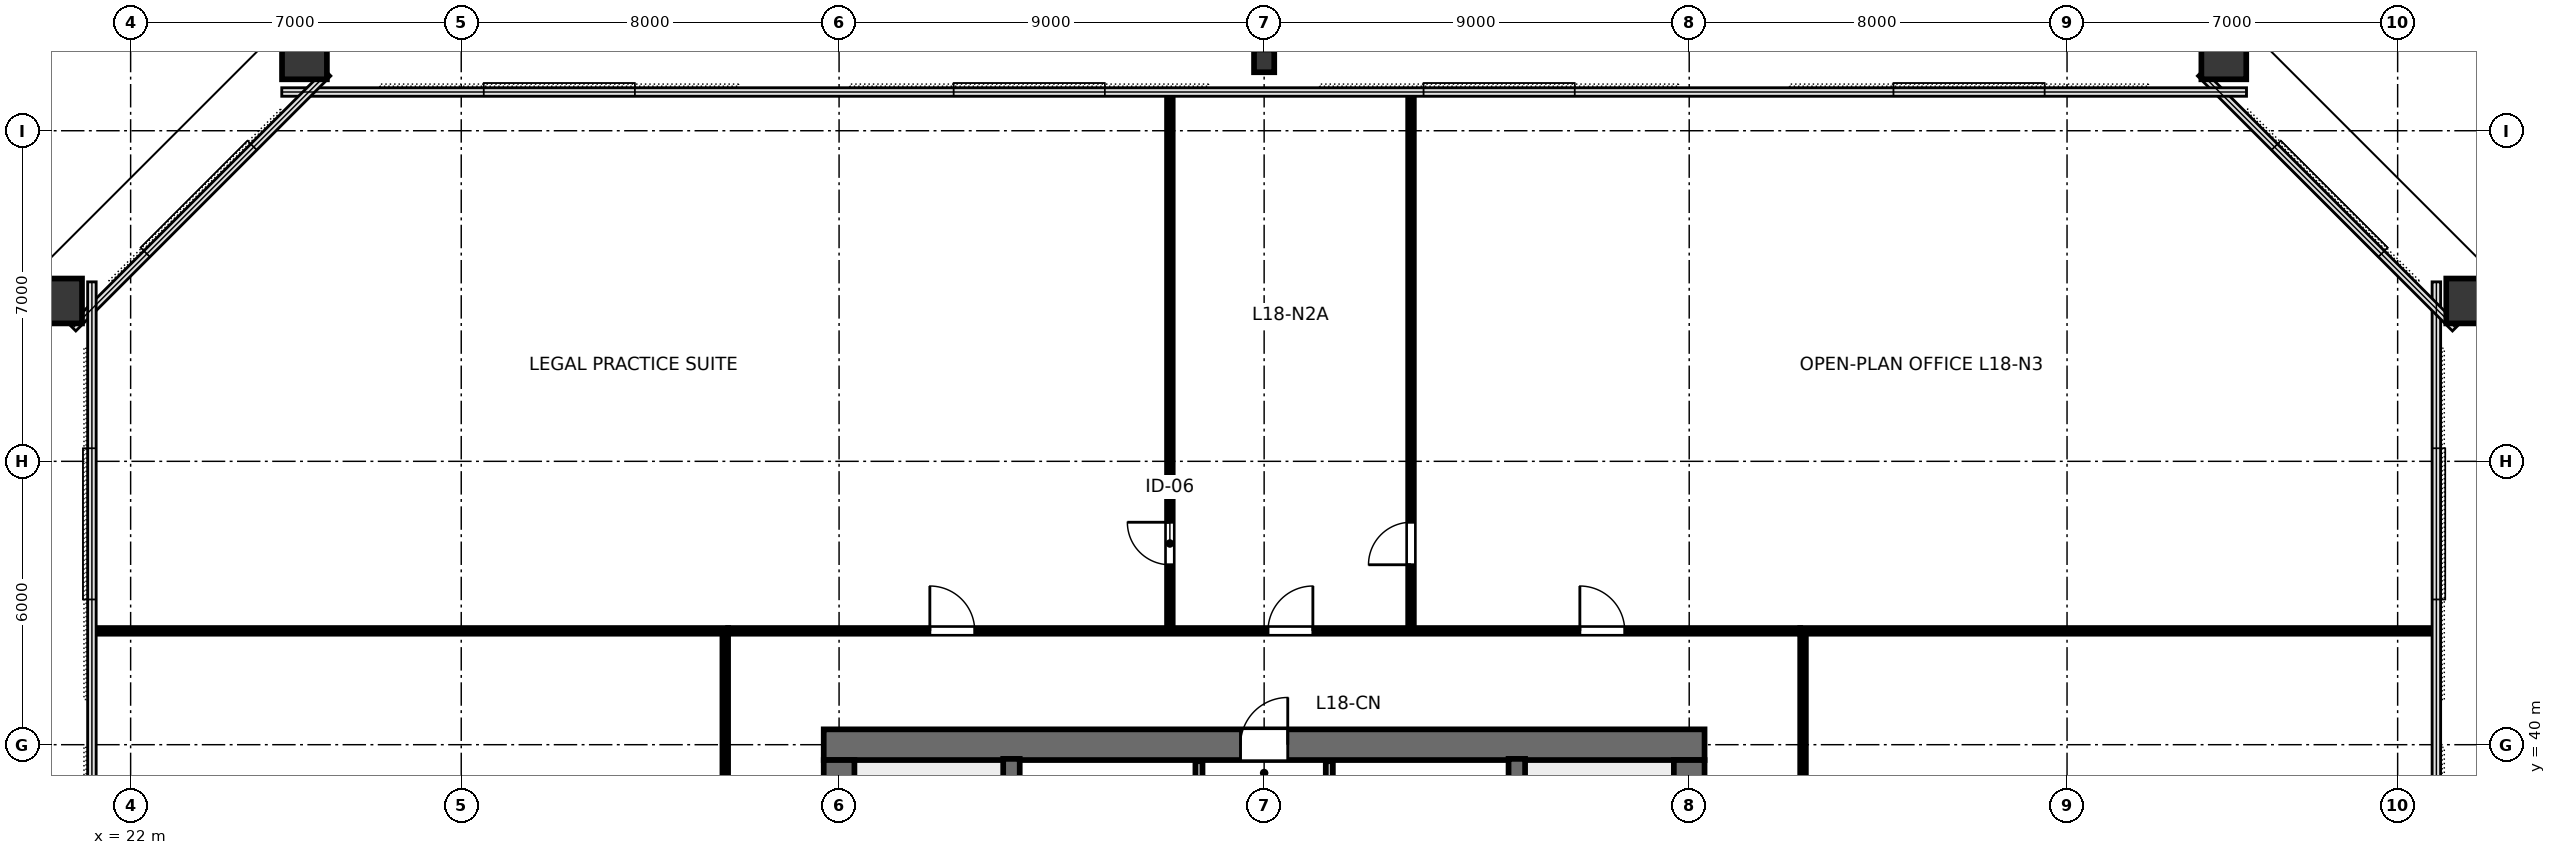
"""IFC4 building model, lengths in metres.
Left out: names, types, materials, properties, quantities, classifications, styles, units other than length and angle.
Written with IfcOpenShell. Run it as: python <this file> out.ifc"""

import sys

from ifc_helpers import new_model, si_unit, direction, frame, frame_2d, origin, origin_2d, place, context, subcontext, project, spatial, rectangle, hollow_rectangle, i_section, extrude, element, fill, save


model = new_model("IFC4")
c1 = context("Model", 3, precision=1e-05, world=origin(), true_north=direction((0.0, 1.0)))
c2 = subcontext(c1, "Body", "Model", "MODEL_VIEW")
j1 = project(units=[si_unit("LENGTHUNIT", "METRE"), si_unit("PLANEANGLEUNIT", "RADIAN")], contexts=[c1])
p1 = place(None, origin())
s1 = spatial("IfcSite", under=j1, at=p1, CompositionType="ELEMENT")
p2 = place(p1, origin())
s2 = spatial("IfcBuilding", under=s1, at=p2, CompositionType="ELEMENT")
p3 = place(p2, frame((0.0, 0.0, 71.2)))
s3 = spatial("IfcBuildingStorey", under=s2, at=p3, CompositionType="ELEMENT", Elevation=71.2)
p4 = place(p3, frame((36.675, 40.0, 0.0), z_axis=(0.0, 0.0, 1.0), x_axis=(1.0, 0.0, 0.0)))
e1 = element("IfcWall", 1, at=p4, inside=s3, PredefinedType="SHEAR", context=c2, shape_type="SweptSolid", body=[
    extrude(rectangle(XDim=18.65, YDim=0.65, at=frame_2d((9.325, 0.0))), origin(), (0.0, 0.0, 1.0), 3.36),
])
p5 = place(p4, frame((8.825, 0.0, 0.0)))
e2 = element("IfcOpeningElement", 2, at=p5, cuts=e1, PredefinedType="OPENING", context=c2, shape_type="SweptSolid", body=[
    extrude(rectangle(XDim=1.0, YDim=2.15, at=frame_2d((0.5, 1.075))), frame((0.0, 0.335, 0.0), z_axis=(0.0, -1.0, 0.0), x_axis=(1.0, 0.0, 0.0)), (0.0, 0.0, 1.0), 0.67),
])
p6 = place(p3, frame((37.0, 24.325, 0.0), z_axis=(0.0, 0.0, 1.0), x_axis=(0.0, 1.0, 0.0)))
e3 = element("IfcWall", 3, at=p6, inside=s3, PredefinedType="SHEAR", context=c2, shape_type="SweptSolid", body=[
    extrude(rectangle(XDim=15.35, YDim=0.65, at=frame_2d((7.675, 0.0))), origin(), (0.0, 0.0, 1.0), 3.36),
])
p7 = place(p6, frame((5.2, 0.0, 0.0)))
e4 = element("IfcOpeningElement", 4, at=p7, cuts=e3, PredefinedType="OPENING", context=c2, shape_type="SweptSolid", body=[
    extrude(rectangle(XDim=1.15, YDim=2.15, at=frame_2d((0.575, 1.075))), frame((0.0, 0.335, 0.0), z_axis=(0.0, -1.0, 0.0), x_axis=(1.0, 0.0, 0.0)), (0.0, 0.0, 1.0), 0.67),
])
p8 = place(p3, frame((55.0, 24.325, 0.0), z_axis=(0.0, 0.0, 1.0), x_axis=(0.0, 1.0, 0.0)))
e5 = element("IfcWall", 5, at=p8, inside=s3, PredefinedType="SHEAR", context=c2, shape_type="SweptSolid", body=[
    extrude(rectangle(XDim=15.35, YDim=0.65, at=frame_2d((7.675, 0.0))), origin(), (0.0, 0.0, 1.0), 3.36),
])
p9 = place(p8, frame((5.2, 0.0, 0.0)))
e6 = element("IfcOpeningElement", 6, at=p9, cuts=e5, PredefinedType="OPENING", context=c2, shape_type="SweptSolid", body=[
    extrude(rectangle(XDim=1.15, YDim=2.15, at=frame_2d((0.575, 1.075))), frame((0.0, 0.335, 0.0), z_axis=(0.0, -1.0, 0.0), x_axis=(1.0, 0.0, 0.0)), (0.0, 0.0, 1.0), 0.67),
])
for number, where, z_axis, x_axis in (
    (7, (71.604, 49.396, 0.0), (0.0, 0.0, 1.0), (0.0, 1.0, 0.0)),
    (8, (66.319, 54.664, 0.0), (0.0, 0.0, 1.0), (1.0, 0.0, 0.0)),
):
    element("IfcColumn", number, at=place(p3, frame(where, z_axis=z_axis, x_axis=x_axis)), inside=s3, PredefinedType="COLUMN", context=c2, shape_type="SweptSolid", body=[
        extrude(hollow_rectangle(XDim=0.95, YDim=1.15, WallThickness=0.06, at=origin_2d()), origin(), (0.0, 0.0, 1.0), 3.358),
    ])
p10 = place(p3, frame((46.0, 54.48, 0.0), z_axis=(0.0, 0.0, 1.0), x_axis=(1.0, 0.0, 0.0)))
e9 = element("IfcColumn", 9, at=p10, inside=s3, PredefinedType="COLUMN", context=c2, shape_type="SweptSolid", body=[
    extrude(i_section(OverallWidth=0.428, OverallDepth=0.483, WebThickness=0.051, FlangeThickness=0.082, FilletRadius=0.025, at=origin_2d()), origin(), (0.0, 0.0, 1.0), 3.358),
])
for number, where, z_axis, x_axis in (
    (10, (25.681, 54.664, 0.0), (0.0, 0.0, 1.0), (1.0, 0.0, 0.0)),
    (11, (20.396, 49.396, 0.0), (0.0, 0.0, 1.0), (0.0, 1.0, 0.0)),
):
    element("IfcColumn", number, at=place(p3, frame(where, z_axis=z_axis, x_axis=x_axis)), inside=s3, PredefinedType="COLUMN", context=c2, shape_type="SweptSolid", body=[
        extrude(hollow_rectangle(XDim=0.95, YDim=1.15, WallThickness=0.06, at=origin_2d()), origin(), (0.0, 0.0, 1.0), 3.358),
    ])
for number, where, z_axis, x_axis in (
    (12, (40.65, 32.0, 0.0), (0.0, 0.0, 1.0), (0.0, 1.0, 0.0)),
    (13, (51.35, 32.0, 0.0), (0.0, 0.0, 1.0), (0.0, 1.0, 0.0)),
):
    element("IfcWall", number, at=place(p3, frame(where, z_axis=z_axis, x_axis=x_axis)), inside=s3, PredefinedType="SHEAR", context=c2, shape_type="SweptSolid", body=[
        extrude(rectangle(XDim=7.7, YDim=0.35, at=frame_2d((3.85, 0.0))), origin(), (0.0, 0.0, 1.0), 3.6),
    ])
p11 = place(p3, frame((44.62, 35.72, 0.0), z_axis=(0.0, 0.0, 1.0), x_axis=(0.0, 1.0, 0.0)))
e14 = element("IfcWall", 14, at=p11, inside=s3, PredefinedType="PARTITIONING", context=c2, shape_type="SweptSolid", body=[
    extrude(rectangle(XDim=3.93, YDim=0.15, at=frame_2d((1.965, 0.0))), origin(), (0.0, 0.0, 1.0), 3.36),
])
p12 = place(p11, frame((1.5, 0.0, 0.0)))
e15 = element("IfcOpeningElement", 15, at=p12, cuts=e14, PredefinedType="OPENING", context=c2, shape_type="SweptSolid", body=[
    extrude(rectangle(XDim=0.9, YDim=2.15, at=frame_2d((0.45, 1.075))), frame((0.0, 0.085, 0.0), z_axis=(0.0, -1.0, 0.0), x_axis=(1.0, 0.0, 0.0)), (0.0, 0.0, 1.0), 0.17),
])
p13 = place(p3, frame((47.38, 35.72, 0.0), z_axis=(0.0, 0.0, 1.0), x_axis=(0.0, 1.0, 0.0)))
e16 = element("IfcWall", 16, at=p13, inside=s3, PredefinedType="PARTITIONING", context=c2, shape_type="SweptSolid", body=[
    extrude(rectangle(XDim=3.93, YDim=0.15, at=frame_2d((1.965, 0.0))), origin(), (0.0, 0.0, 1.0), 3.36),
])
p14 = place(p13, frame((1.5, 0.0, 0.0)))
e17 = element("IfcOpeningElement", 17, at=p14, cuts=e16, PredefinedType="OPENING", context=c2, shape_type="SweptSolid", body=[
    extrude(rectangle(XDim=0.9, YDim=2.15, at=frame_2d((0.45, 1.075))), frame((0.0, 0.085, 0.0), z_axis=(0.0, -1.0, 0.0), x_axis=(1.0, 0.0, 0.0)), (0.0, 0.0, 1.0), 0.17),
])
p15 = place(p3, frame((44.004, 42.41, 0.0), z_axis=(0.0, 0.0, 1.0), x_axis=(0.0, 1.0, 0.0)))
e18 = element("IfcWall", 18, at=p15, inside=s3, PredefinedType="PARTITIONING", context=c2, shape_type="SweptSolid", body=[
    extrude(rectangle(XDim=11.41, YDim=0.12, at=frame_2d((5.705, 0.0))), origin(), (0.0, 0.0, 1.0), 2.64),
])
p16 = place(p15, frame((1.4, 0.0, 0.0)))
e19 = element("IfcOpeningElement", 19, at=p16, cuts=e18, PredefinedType="OPENING", context=c2, shape_type="SweptSolid", body=[
    extrude(rectangle(XDim=0.9, YDim=2.15, at=frame_2d((0.45, 1.075))), frame((0.0, 0.07, 0.0), z_axis=(0.0, -1.0, 0.0), x_axis=(1.0, 0.0, 0.0)), (0.0, 0.0, 1.0), 0.14),
])
p17 = place(p3, frame((49.11, 42.41, 0.0), z_axis=(0.0, 0.0, 1.0), x_axis=(0.0, 1.0, 0.0)))
e20 = element("IfcWall", 20, at=p17, inside=s3, PredefinedType="PARTITIONING", context=c2, shape_type="SweptSolid", body=[
    extrude(rectangle(XDim=11.41, YDim=0.12, at=frame_2d((5.705, 0.0))), origin(), (0.0, 0.0, 1.0), 2.64),
])
p18 = place(p17, frame((1.4, 0.0, 0.0)))
e21 = element("IfcOpeningElement", 21, at=p18, cuts=e20, PredefinedType="OPENING", context=c2, shape_type="SweptSolid", body=[
    extrude(rectangle(XDim=0.9, YDim=2.15, at=frame_2d((0.45, 1.075))), frame((0.0, 0.07, 0.0), z_axis=(0.0, -1.0, 0.0), x_axis=(1.0, 0.0, 0.0)), (0.0, 0.0, 1.0), 0.14),
])
p19 = place(p3, frame((34.65, 42.41, 0.0), z_axis=(0.0, 0.0, 1.0), x_axis=(1.0, 0.0, 0.0)))
e22 = element("IfcWall", 22, at=p19, inside=s3, PredefinedType="PARTITIONING", context=c2, shape_type="SweptSolid", body=[
    extrude(rectangle(XDim=22.7, YDim=0.12, at=frame_2d((11.35, 0.0))), origin(), (0.0, 0.0, 1.0), 2.64),
])
p20 = place(p19, frame((4.272, 0.0, 0.0)))
e23 = element("IfcOpeningElement", 23, at=p20, cuts=e22, PredefinedType="OPENING", context=c2, shape_type="SweptSolid", body=[
    extrude(rectangle(XDim=0.95, YDim=2.15, at=frame_2d((0.475, 1.075))), frame((0.0, 0.07, 0.0), z_axis=(0.0, -1.0, 0.0), x_axis=(1.0, 0.0, 0.0)), (0.0, 0.0, 1.0), 0.14),
])
p21 = place(p19, frame((11.432, 0.0, 0.0)))
e24 = element("IfcOpeningElement", 24, at=p21, cuts=e22, PredefinedType="OPENING", context=c2, shape_type="SweptSolid", body=[
    extrude(rectangle(XDim=0.95, YDim=2.15, at=frame_2d((0.475, 1.075))), frame((0.0, 0.07, 0.0), z_axis=(0.0, -1.0, 0.0), x_axis=(1.0, 0.0, 0.0)), (0.0, 0.0, 1.0), 0.14),
])
p22 = place(p19, frame((18.035, 0.0, 0.0)))
e25 = element("IfcOpeningElement", 25, at=p22, cuts=e22, PredefinedType="OPENING", context=c2, shape_type="SweptSolid", body=[
    extrude(rectangle(XDim=0.95, YDim=2.15, at=frame_2d((0.475, 1.075))), frame((0.0, 0.07, 0.0), z_axis=(0.0, -1.0, 0.0), x_axis=(1.0, 0.0, 0.0)), (0.0, 0.0, 1.0), 0.14),
])
p23 = place(p3, frame((34.59, 21.65, 0.0), z_axis=(0.0, 0.0, 1.0), x_axis=(0.0, 1.0, 0.0)))
e26 = element("IfcWall", 26, at=p23, inside=s3, PredefinedType="PARTITIONING", context=c2, shape_type="SweptSolid", body=[
    extrude(rectangle(XDim=20.7, YDim=0.12, at=frame_2d((10.35, 0.0))), origin(), (0.0, 0.0, 1.0), 2.64),
])
p24 = place(p23, frame((2.105, 0.0, 0.0)))
e27 = element("IfcOpeningElement", 27, at=p24, cuts=e26, PredefinedType="OPENING", context=c2, shape_type="SweptSolid", body=[
    extrude(rectangle(XDim=0.95, YDim=2.15, at=frame_2d((0.475, 1.075))), frame((0.0, 0.07, 0.0), z_axis=(0.0, -1.0, 0.0), x_axis=(1.0, 0.0, 0.0)), (0.0, 0.0, 1.0), 0.14),
])
p25 = place(p23, frame((7.369, 0.0, 0.0)))
e28 = element("IfcOpeningElement", 28, at=p25, cuts=e26, PredefinedType="OPENING", context=c2, shape_type="SweptSolid", body=[
    extrude(rectangle(XDim=0.95, YDim=2.15, at=frame_2d((0.475, 1.075))), frame((0.0, 0.07, 0.0), z_axis=(0.0, -1.0, 0.0), x_axis=(1.0, 0.0, 0.0)), (0.0, 0.0, 1.0), 0.14),
])
p26 = place(p23, frame((15.139, 0.0, 0.0)))
e29 = element("IfcOpeningElement", 29, at=p26, cuts=e26, PredefinedType="OPENING", context=c2, shape_type="SweptSolid", body=[
    extrude(rectangle(XDim=0.95, YDim=2.15, at=frame_2d((0.475, 1.075))), frame((0.0, 0.07, 0.0), z_axis=(0.0, -1.0, 0.0), x_axis=(1.0, 0.0, 0.0)), (0.0, 0.0, 1.0), 0.14),
])
p27 = place(p3, frame((57.41, 21.65, 0.0), z_axis=(0.0, 0.0, 1.0), x_axis=(0.0, 1.0, 0.0)))
e30 = element("IfcWall", 30, at=p27, inside=s3, PredefinedType="PARTITIONING", context=c2, shape_type="SweptSolid", body=[
    extrude(rectangle(XDim=20.7, YDim=0.12, at=frame_2d((10.35, 0.0))), origin(), (0.0, 0.0, 1.0), 2.64),
])
p28 = place(p27, frame((4.931, 0.0, 0.0)))
e31 = element("IfcOpeningElement", 31, at=p28, cuts=e30, PredefinedType="OPENING", context=c2, shape_type="SweptSolid", body=[
    extrude(rectangle(XDim=0.95, YDim=2.15, at=frame_2d((0.475, 1.075))), frame((0.0, 0.07, 0.0), z_axis=(0.0, -1.0, 0.0), x_axis=(1.0, 0.0, 0.0)), (0.0, 0.0, 1.0), 0.14),
])
p29 = place(p27, frame((15.081, 0.0, 0.0)))
e32 = element("IfcOpeningElement", 32, at=p29, cuts=e30, PredefinedType="OPENING", context=c2, shape_type="SweptSolid", body=[
    extrude(rectangle(XDim=0.95, YDim=2.15, at=frame_2d((0.475, 1.075))), frame((0.0, 0.07, 0.0), z_axis=(0.0, -1.0, 0.0), x_axis=(1.0, 0.0, 0.0)), (0.0, 0.0, 1.0), 0.14),
])
for number, where, z_axis, x_axis in (
    (33, (34.65, 42.41, 0.0), (0.0, 0.0, 1.0), (-1.0, 0.0, 0.0)),
    (34, (57.35, 42.41, 0.0), (0.0, 0.0, 1.0), (1.0, 0.0, 0.0)),
):
    element("IfcWall", number, at=place(p3, frame(where, z_axis=z_axis, x_axis=x_axis)), inside=s3, PredefinedType="PARTITIONING", context=c2, shape_type="SweptSolid", body=[
        extrude(rectangle(XDim=13.47, YDim=0.12, at=frame_2d((6.735, 0.0))), origin(), (0.0, 0.0, 1.0), 2.64),
    ])
p30 = place(p5, origin())
e35 = element("IfcDoor", 35, at=p30, inside=s3, OperationType="SINGLE_SWING_RIGHT", PredefinedType="DOOR", context=c2, shape_type="SweptSolid", body=[
    extrude(rectangle(XDim=1.0, YDim=2.15, at=frame_2d((0.5, 1.075))), frame((0.0, 0.025, 0.0), z_axis=(0.0, -1.0, 0.0), x_axis=(1.0, 0.0, 0.0)), (0.0, 0.0, 1.0), 0.05),
])
fill(e2, e35)
p31 = place(p16, origin())
e36 = element("IfcDoor", 36, at=p31, inside=s3, OperationType="SINGLE_SWING_RIGHT", PredefinedType="DOOR", context=c2, shape_type="SweptSolid", body=[
    extrude(rectangle(XDim=0.9, YDim=2.15, at=frame_2d((0.45, 1.075))), frame((0.0, 0.025, 0.0), z_axis=(0.0, -1.0, 0.0), x_axis=(1.0, 0.0, 0.0)), (0.0, 0.0, 1.0), 0.05),
])
fill(e19, e36)
p32 = place(p18, origin())
e37 = element("IfcDoor", 37, at=p32, inside=s3, OperationType="SINGLE_SWING_LEFT", PredefinedType="DOOR", context=c2, shape_type="SweptSolid", body=[
    extrude(rectangle(XDim=0.9, YDim=2.15, at=frame_2d((0.45, 1.075))), frame((0.0, 0.025, 0.0), z_axis=(0.0, -1.0, 0.0), x_axis=(1.0, 0.0, 0.0)), (0.0, 0.0, 1.0), 0.05),
])
fill(e21, e37)
p33 = place(p20, origin())
e38 = element("IfcDoor", 38, at=p33, inside=s3, OperationType="SINGLE_SWING_LEFT", PredefinedType="DOOR", context=c2, shape_type="SweptSolid", body=[
    extrude(rectangle(XDim=0.95, YDim=2.15, at=frame_2d((0.475, 1.075))), frame((0.0, 0.025, 0.0), z_axis=(0.0, -1.0, 0.0), x_axis=(1.0, 0.0, 0.0)), (0.0, 0.0, 1.0), 0.05),
])
fill(e23, e38)
p34 = place(p21, origin())
e39 = element("IfcDoor", 39, at=p34, inside=s3, OperationType="SINGLE_SWING_RIGHT", PredefinedType="DOOR", context=c2, shape_type="SweptSolid", body=[
    extrude(rectangle(XDim=0.95, YDim=2.15, at=frame_2d((0.475, 1.075))), frame((0.0, 0.025, 0.0), z_axis=(0.0, -1.0, 0.0), x_axis=(1.0, 0.0, 0.0)), (0.0, 0.0, 1.0), 0.05),
])
fill(e24, e39)
p35 = place(p22, origin())
e40 = element("IfcDoor", 40, at=p35, inside=s3, OperationType="SINGLE_SWING_LEFT", PredefinedType="DOOR", context=c2, shape_type="SweptSolid", body=[
    extrude(rectangle(XDim=0.95, YDim=2.15, at=frame_2d((0.475, 1.075))), frame((0.0, 0.025, 0.0), z_axis=(0.0, -1.0, 0.0), x_axis=(1.0, 0.0, 0.0)), (0.0, 0.0, 1.0), 0.05),
])
fill(e25, e40)
save(model, sys.argv[1])
